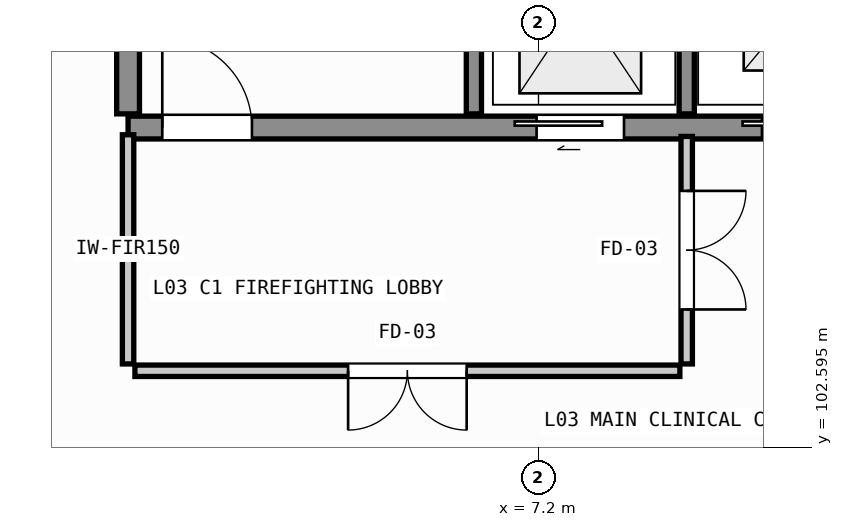
"""IFC4 building model, lengths in metres.
Left out: names, types, materials, properties, quantities, classifications, styles, units other than length and angle.
Written with IfcOpenShell. Run it as: python <this file> out.ifc"""

import sys

from ifc_helpers import new_model, si_unit, direction, frame, frame_2d, origin, place, context, subcontext, project, spatial, rectangle, extrude, element, fill, save


model = new_model("IFC4")
c1 = context("Model", 3, precision=1e-05, world=origin(), true_north=direction((0.0, 1.0)))
c2 = subcontext(c1, "Body", "Model", "MODEL_VIEW")
j1 = project(units=[si_unit("LENGTHUNIT", "METRE"), si_unit("PLANEANGLEUNIT", "RADIAN")], contexts=[c1])
p1 = place(None, origin())
s1 = spatial("IfcSite", under=j1, at=p1, CompositionType="ELEMENT")
p2 = place(p1, origin())
s2 = spatial("IfcBuilding", under=s1, at=p2, CompositionType="ELEMENT")
p3 = place(p2, frame((0.0, 0.0, 9.3)))
s3 = spatial("IfcBuildingStorey", under=s2, at=p3, CompositionType="ELEMENT", Elevation=9.3)
p4 = place(p3, frame((1.8, 106.8, 0.0), z_axis=(0.0, 0.0, 1.0), x_axis=(1.0, 0.0, 0.0)))
e1 = element("IfcWall", 1, at=p4, inside=s3, PredefinedType="SHEAR", context=c2, shape_type="SweptSolid", body=[
    extrude(rectangle(XDim=10.8, YDim=0.3, at=frame_2d((5.4, 0.0))), origin(), (0.0, 0.0, 1.0), 4.2),
])
p5 = place(p4, frame((0.45, 0.0, 0.0)))
e2 = element("IfcOpeningElement", 2, at=p5, cuts=e1, PredefinedType="OPENING", context=c2, shape_type="SweptSolid", body=[
    extrude(rectangle(XDim=1.18, YDim=2.16, at=frame_2d((0.59, 1.08))), frame((0.0, 0.16, 0.0), z_axis=(0.0, -1.0, 0.0), x_axis=(1.0, 0.0, 0.0)), (0.0, 0.0, 1.0), 0.32),
])
p6 = place(p4, frame((5.375, 0.0, 0.0)))
e3 = element("IfcOpeningElement", 3, at=p6, cuts=e1, PredefinedType="OPENING", context=c2, shape_type="SweptSolid", body=[
    extrude(rectangle(XDim=1.15, YDim=2.15, at=frame_2d((0.575, 1.075))), frame((0.0, 0.16, 0.0), z_axis=(0.0, -1.0, 0.0), x_axis=(1.0, 0.0, 0.0)), (0.0, 0.0, 1.0), 0.32),
])
p7 = place(p4, frame((8.34, 0.0, 0.0)))
e4 = element("IfcOpeningElement", 4, at=p7, cuts=e1, PredefinedType="OPENING", context=c2, shape_type="SweptSolid", body=[
    extrude(rectangle(XDim=1.02, YDim=2.12, at=frame_2d((0.51, 1.06))), frame((0.0, 0.16, 0.0), z_axis=(0.0, -1.0, 0.0), x_axis=(1.0, 0.0, 0.0)), (0.0, 0.0, 1.0), 0.32),
])
p8 = place(p3, frame((1.8, 106.98, 0.0), z_axis=(0.0, 0.0, 1.0), x_axis=(0.0, 1.0, 0.0)))
e5 = element("IfcWall", 5, at=p8, inside=s3, PredefinedType="SHEAR", context=c2, shape_type="SweptSolid", body=[
    extrude(rectangle(XDim=6.24, YDim=0.3, at=frame_2d((3.12, 0.0))), origin(), (0.0, 0.0, 1.0), 4.2),
])
for number, where, z_axis, x_axis in (
    (6, (6.35, 106.98, 0.0), (0.0, 0.0, 1.0), (0.0, 1.0, 0.0)),
    (7, (9.15, 106.98, 0.0), (0.0, 0.0, 1.0), (0.0, 1.0, 0.0)),
):
    element("IfcWall", number, at=place(p3, frame(where, z_axis=z_axis, x_axis=x_axis)), inside=s3, PredefinedType="SHEAR", context=c2, shape_type="SweptSolid", body=[
        extrude(rectangle(XDim=3.15, YDim=0.2, at=frame_2d((1.575, 0.0))), origin(), (0.0, 0.0, 1.0), 4.2),
    ])
p9 = place(p3, frame((1.8, 103.69, 0.0), z_axis=(0.0, 0.0, 1.0), x_axis=(0.0, 1.0, 0.0)))
e8 = element("IfcWall", 8, at=p9, inside=s3, PredefinedType="PARTITIONING", context=c2, shape_type="SweptSolid", body=[
    extrude(rectangle(XDim=3.015, YDim=0.15, at=frame_2d((1.508, 0.0))), origin(), (0.0, 0.0, 1.0), 3.97),
])
p10 = place(p3, frame((9.15, 106.683, 0.0), z_axis=(0.0, 0.0, 1.0), x_axis=(0.0, -1.0, 0.0)))
e9 = element("IfcWall", 9, at=p10, inside=s3, PredefinedType="PARTITIONING", context=c2, shape_type="SweptSolid", body=[
    extrude(rectangle(XDim=2.993, YDim=0.15, at=frame_2d((1.497, 0.0))), origin(), (0.0, 0.0, 1.0), 3.97),
])
p11 = place(p10, frame((0.717, 0.0, 0.0)))
e10 = element("IfcOpeningElement", 10, at=p11, cuts=e9, PredefinedType="OPENING", context=c2, shape_type="SweptSolid", body=[
    extrude(rectangle(XDim=1.56, YDim=2.22, at=frame_2d((0.78, 1.11))), frame((0.0, 0.085, 0.0), z_axis=(0.0, -1.0, 0.0), x_axis=(1.0, 0.0, 0.0)), (0.0, 0.0, 1.0), 0.17),
])
p12 = place(p3, frame((9.06, 103.6, 0.0), z_axis=(0.0, 0.0, 1.0), x_axis=(-1.0, 0.0, 0.0)))
e11 = element("IfcWall", 11, at=p12, inside=s3, PredefinedType="PARTITIONING", context=c2, shape_type="SweptSolid", body=[
    extrude(rectangle(XDim=7.17, YDim=0.15, at=frame_2d((3.585, 0.0))), origin(), (0.0, 0.0, 1.0), 3.97),
])
p13 = place(p12, frame((2.805, 0.0, 0.0)))
e12 = element("IfcOpeningElement", 12, at=p13, cuts=e11, PredefinedType="OPENING", context=c2, shape_type="SweptSolid", body=[
    extrude(rectangle(XDim=1.56, YDim=2.22, at=frame_2d((0.78, 1.11))), frame((0.0, 0.085, 0.0), z_axis=(0.0, -1.0, 0.0), x_axis=(1.0, 0.0, 0.0)), (0.0, 0.0, 1.0), 0.17),
])
p14 = place(p5, origin())
e13 = element("IfcDoor", 13, at=p14, inside=s3, OperationType="SINGLE_SWING_LEFT", PredefinedType="DOOR", context=c2, shape_type="SweptSolid", body=[
    extrude(rectangle(XDim=1.18, YDim=2.16, at=frame_2d((0.59, 1.08))), frame((0.0, 0.025, 0.0), z_axis=(0.0, -1.0, 0.0), x_axis=(1.0, 0.0, 0.0)), (0.0, 0.0, 1.0), 0.05),
])
fill(e2, e13)
p15 = place(p6, origin())
e14 = element("IfcDoor", 14, at=p15, inside=s3, OperationType="DOUBLE_DOOR_SLIDING", PredefinedType="DOOR", context=c2, shape_type="SweptSolid", body=[
    extrude(rectangle(XDim=1.15, YDim=2.15, at=frame_2d((0.575, 1.075))), frame((0.0, 0.025, 0.0), z_axis=(0.0, -1.0, 0.0), x_axis=(1.0, 0.0, 0.0)), (0.0, 0.0, 1.0), 0.05),
])
fill(e3, e14)
p16 = place(p7, origin())
e15 = element("IfcDoor", 15, at=p16, inside=s3, OperationType="SLIDING_TO_LEFT", PredefinedType="DOOR", context=c2, shape_type="SweptSolid", body=[
    extrude(rectangle(XDim=1.02, YDim=2.12, at=frame_2d((0.51, 1.06))), frame((0.0, 0.025, 0.0), z_axis=(0.0, -1.0, 0.0), x_axis=(1.0, 0.0, 0.0)), (0.0, 0.0, 1.0), 0.05),
])
fill(e4, e15)
p17 = place(p11, origin())
e16 = element("IfcDoor", 16, at=p17, inside=s3, OperationType="DOUBLE_DOOR_SINGLE_SWING", PredefinedType="DOOR", context=c2, shape_type="SweptSolid", body=[
    extrude(rectangle(XDim=1.56, YDim=2.22, at=frame_2d((0.78, 1.11))), frame((0.0, 0.025, 0.0), z_axis=(0.0, -1.0, 0.0), x_axis=(1.0, 0.0, 0.0)), (0.0, 0.0, 1.0), 0.05),
])
fill(e10, e16)
p18 = place(p13, origin())
e17 = element("IfcDoor", 17, at=p18, inside=s3, OperationType="DOUBLE_DOOR_SINGLE_SWING", PredefinedType="DOOR", context=c2, shape_type="SweptSolid", body=[
    extrude(rectangle(XDim=1.56, YDim=2.22, at=frame_2d((0.78, 1.11))), frame((0.0, 0.025, 0.0), z_axis=(0.0, -1.0, 0.0), x_axis=(1.0, 0.0, 0.0)), (0.0, 0.0, 1.0), 0.05),
])
fill(e12, e17)
save(model, sys.argv[1])
